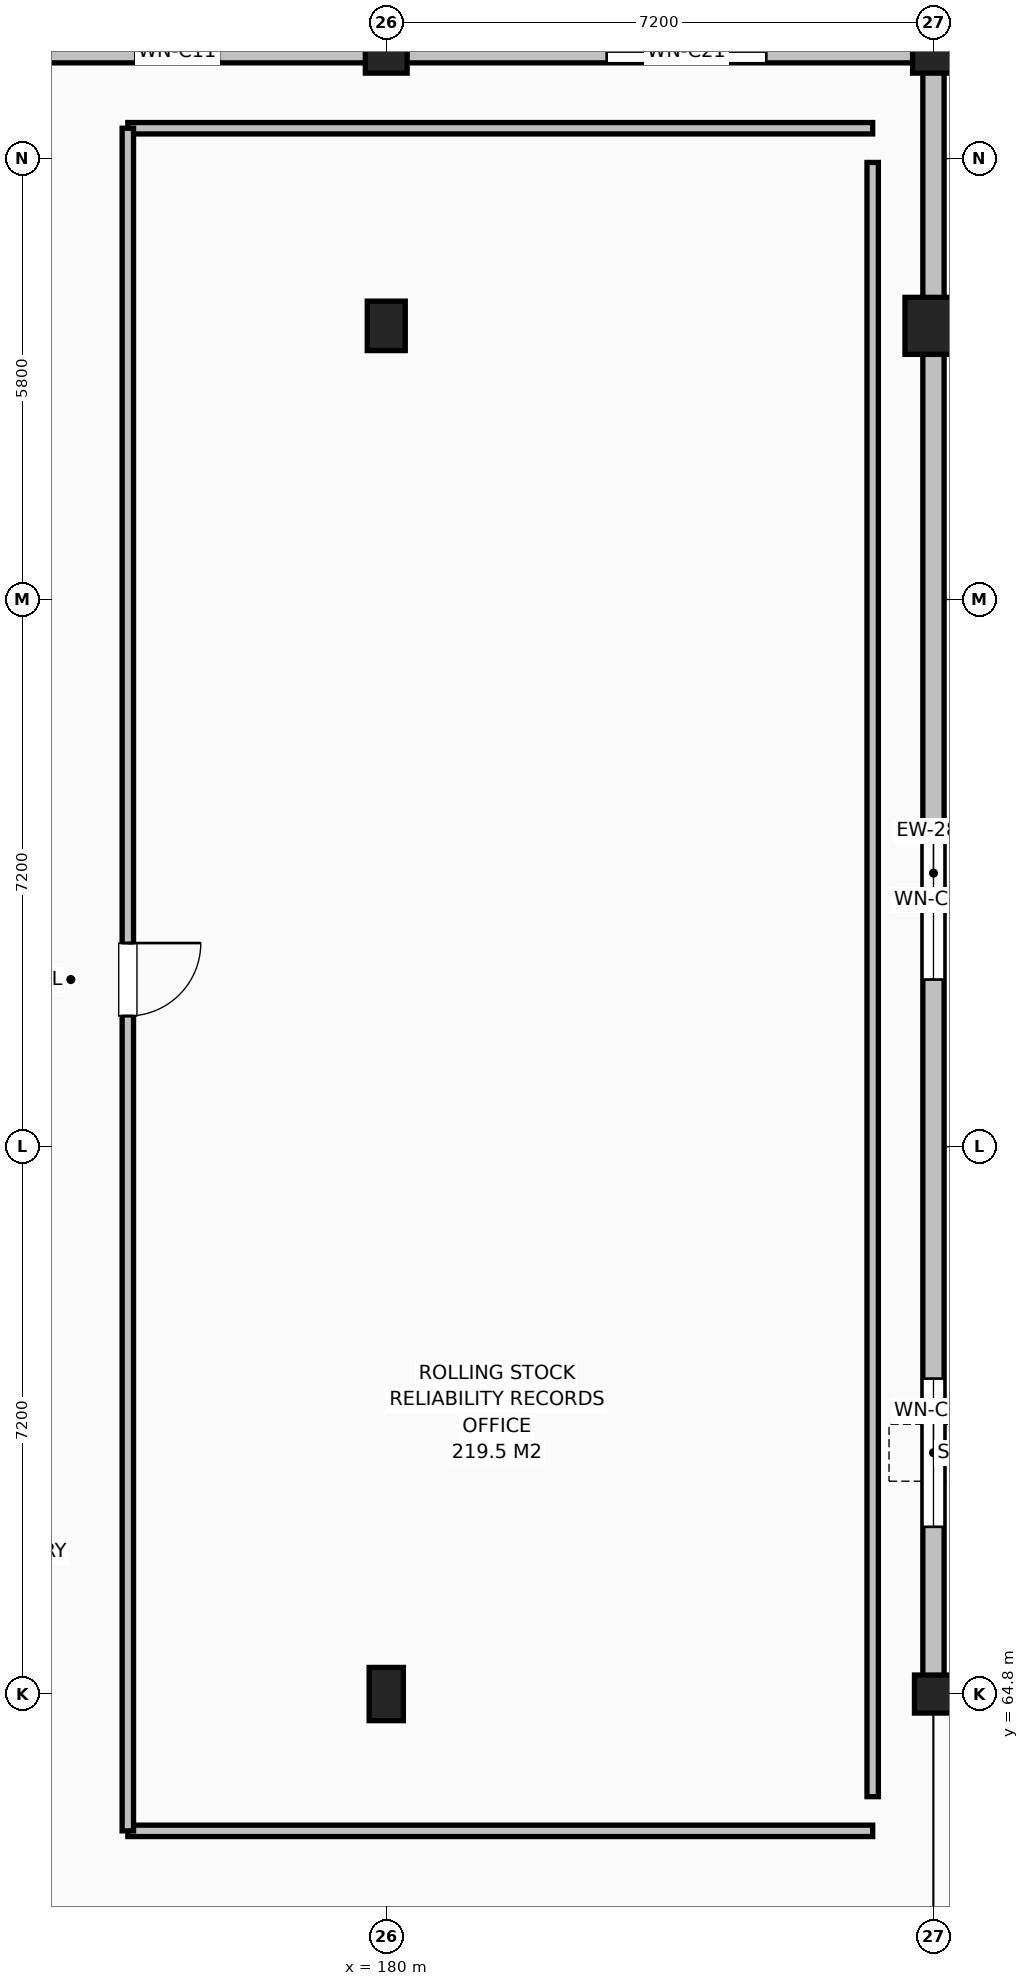
"""IFC4 building model, lengths in metres.
Left out: names, types, materials, properties, quantities, classifications, styles, units other than length and angle.
Written with IfcOpenShell. Run it as: python <this file> out.ifc"""

import sys

from ifc_helpers import new_model, si_unit, direction, frame, frame_2d, origin, origin_2d, place, context, subcontext, project, spatial, rectangle, circle, extrude, element, fill, save


model = new_model("IFC4")
c1 = context("Model", 3, precision=1e-05, world=origin(), true_north=direction((0.0, 1.0)))
c2 = subcontext(c1, "Body", "Model", "MODEL_VIEW")
j1 = project(units=[si_unit("LENGTHUNIT", "METRE"), si_unit("PLANEANGLEUNIT", "RADIAN")], contexts=[c1])
p1 = place(None, origin())
s1 = spatial("IfcSite", under=j1, at=p1, CompositionType="ELEMENT")
p2 = place(p1, origin())
s2 = spatial("IfcBuilding", under=s1, at=p2, CompositionType="ELEMENT")
p3 = place(p2, frame((0.0, 0.0, 4.8)))
s3 = spatial("IfcBuildingStorey", under=s2, at=p3, CompositionType="ELEMENT", Elevation=4.8)
p4 = place(p3, frame((180.0, 64.8, 0.0), z_axis=(0.0, 0.0, 1.0), x_axis=(1.0, 0.0, 0.0)))
e1 = element("IfcColumn", 1, at=p4, inside=s3, PredefinedType="COLUMN", context=c2, shape_type="SweptSolid", body=[
    extrude(rectangle(XDim=0.45, YDim=0.7, at=origin_2d()), origin(), (0.0, 0.0, 1.0), 4.2),
])
p5 = place(p3, frame((180.0, 82.8, 0.0), z_axis=(0.0, 0.0, 1.0), x_axis=(1.0, 0.0, 0.0)))
e2 = element("IfcColumn", 2, at=p5, inside=s3, PredefinedType="COLUMN", context=c2, shape_type="SweptSolid", body=[
    extrude(rectangle(XDim=0.5, YDim=0.65, at=origin_2d()), origin(), (0.0, 0.0, 1.0), 4.2),
])
p6 = place(p3, frame((180.0, 86.4, 0.0), z_axis=(0.0, 0.0, 1.0), x_axis=(1.0, 0.0, 0.0)))
e3 = element("IfcColumn", 3, at=p6, inside=s3, PredefinedType="COLUMN", context=c2, shape_type="SweptSolid", body=[
    extrude(rectangle(XDim=0.55, YDim=0.55, at=origin_2d()), origin(), (0.0, 0.0, 1.0), 4.2),
])
p7 = place(p3, frame((187.2, 64.8, 0.0), z_axis=(0.0, 0.0, 1.0), x_axis=(1.0, 0.0, 0.0)))
e4 = element("IfcColumn", 4, at=p7, inside=s3, PredefinedType="COLUMN", context=c2, shape_type="SweptSolid", body=[
    extrude(circle(Radius=0.25, at=origin_2d()), origin(), (0.0, 0.0, 1.0), 4.2),
])
p8 = place(p3, frame((187.2, 82.8, 0.0), z_axis=(0.0, 0.0, 1.0), x_axis=(1.0, 0.0, 0.0)))
e5 = element("IfcColumn", 5, at=p8, inside=s3, PredefinedType="COLUMN", context=c2, shape_type="SweptSolid", body=[
    extrude(circle(Radius=0.375, at=origin_2d()), origin(), (0.0, 0.0, 1.0), 4.2),
])
p9 = place(p3, frame((187.2, 86.4, 0.0), z_axis=(0.0, 0.0, 1.0), x_axis=(1.0, 0.0, 0.0)))
e6 = element("IfcColumn", 6, at=p9, inside=s3, PredefinedType="COLUMN", context=c2, shape_type="SweptSolid", body=[
    extrude(rectangle(XDim=0.55, YDim=0.55, at=origin_2d()), origin(), (0.0, 0.0, 1.0), 4.2),
])
p10 = place(p3, frame((187.2, 64.8, 0.0), z_axis=(0.0, 0.0, 1.0), x_axis=(0.0, 1.0, 0.0)))
e7 = element("IfcWall", 7, at=p10, inside=s3, PredefinedType="SOLIDWALL", context=c2, shape_type="SweptSolid", body=[
    extrude(rectangle(XDim=21.6, YDim=0.28, at=frame_2d((10.8, 0.0))), origin(), (0.0, 0.0, 1.0), 3.5),
])
p11 = place(p10, frame((2.2, 0.0, 0.78)))
e8 = element("IfcOpeningElement", 8, at=p11, cuts=e7, PredefinedType="OPENING", context=c2, shape_type="SweptSolid", body=[
    extrude(rectangle(XDim=1.95, YDim=1.8, at=frame_2d((0.975, 0.9))), frame((0.0, 0.15, 0.0), z_axis=(0.0, -1.0, 0.0), x_axis=(1.0, 0.0, 0.0)), (0.0, 0.0, 1.0), 0.3),
])
p12 = place(p10, frame((9.4, 0.0, 0.78)))
e9 = element("IfcOpeningElement", 9, at=p12, cuts=e7, PredefinedType="OPENING", context=c2, shape_type="SweptSolid", body=[
    extrude(rectangle(XDim=2.1, YDim=1.8, at=frame_2d((1.05, 0.9))), frame((0.0, 0.15, 0.0), z_axis=(0.0, -1.0, 0.0), x_axis=(1.0, 0.0, 0.0)), (0.0, 0.0, 1.0), 0.3),
])
p13 = place(p3, frame((187.2, 86.4, 0.0), z_axis=(0.0, 0.0, 1.0), x_axis=(-1.0, 0.0, 0.0)))
e10 = element("IfcWall", 10, at=p13, inside=s3, PredefinedType="SOLIDWALL", context=c2, shape_type="SweptSolid", body=[
    extrude(rectangle(XDim=21.6, YDim=0.28, at=frame_2d((10.8, 0.0))), origin(), (0.0, 0.0, 1.0), 3.5),
])
p14 = place(p13, frame((2.2, 0.0, 0.78)))
e11 = element("IfcOpeningElement", 11, at=p14, cuts=e10, PredefinedType="OPENING", context=c2, shape_type="SweptSolid", body=[
    extrude(rectangle(XDim=2.1, YDim=1.8, at=frame_2d((1.05, 0.9))), frame((0.0, 0.15, 0.0), z_axis=(0.0, -1.0, 0.0), x_axis=(1.0, 0.0, 0.0)), (0.0, 0.0, 1.0), 0.3),
])
p15 = place(p13, frame((9.4, 0.0, 0.78)))
e12 = element("IfcOpeningElement", 12, at=p15, cuts=e10, PredefinedType="OPENING", context=c2, shape_type="SweptSolid", body=[
    extrude(rectangle(XDim=1.1, YDim=1.65, at=frame_2d((0.55, 0.825))), frame((0.0, 0.15, 0.0), z_axis=(0.0, -1.0, 0.0), x_axis=(1.0, 0.0, 0.0)), (0.0, 0.0, 1.0), 0.3),
])
p16 = place(p3, frame((216.0, 64.8, 0.0), z_axis=(0.0, 0.0, 1.0), x_axis=(-1.0, 0.0, 0.0)))
e13 = element("IfcWall", 13, at=p16, inside=s3, PredefinedType="SOLIDWALL", context=c2, shape_type="SweptSolid", body=[
    extrude(rectangle(XDim=28.8, YDim=0.28, at=frame_2d((14.4, 0.0))), origin(), (0.0, 0.0, 1.0), 3.235),
])
p17 = place(p16, frame((2.2, 0.0, 0.72)))
e14 = element("IfcOpeningElement", 14, at=p17, cuts=e13, PredefinedType="OPENING", context=c2, shape_type="SweptSolid", body=[
    extrude(rectangle(XDim=1.8, YDim=2.15, at=frame_2d((0.9, 1.075))), frame((0.0, 0.15, 0.0), z_axis=(0.0, -1.0, 0.0), x_axis=(1.0, 0.0, 0.0)), (0.0, 0.0, 1.0), 0.3),
])
p18 = place(p16, frame((9.4, 0.0, 0.72)))
e15 = element("IfcOpeningElement", 15, at=p18, cuts=e13, PredefinedType="OPENING", context=c2, shape_type="SweptSolid", body=[
    extrude(rectangle(XDim=1.2, YDim=2.0, at=frame_2d((0.6, 1.0))), frame((0.0, 0.15, 0.0), z_axis=(0.0, -1.0, 0.0), x_axis=(1.0, 0.0, 0.0)), (0.0, 0.0, 1.0), 0.3),
])
p19 = place(p16, frame((16.6, 0.0, 0.72)))
e16 = element("IfcOpeningElement", 16, at=p19, cuts=e13, PredefinedType="OPENING", context=c2, shape_type="SweptSolid", body=[
    extrude(rectangle(XDim=1.35, YDim=2.05, at=frame_2d((0.675, 1.025))), frame((0.0, 0.15, 0.0), z_axis=(0.0, -1.0, 0.0), x_axis=(1.0, 0.0, 0.0)), (0.0, 0.0, 1.0), 0.3),
])
p20 = place(p3, frame((176.6, 85.4, 0.0), z_axis=(0.0, 0.0, 1.0), x_axis=(1.0, 0.0, 0.0)))
e17 = element("IfcWall", 17, at=p20, inside=s3, PredefinedType="PARTITIONING", context=c2, shape_type="SweptSolid", body=[
    extrude(rectangle(XDim=9.8, YDim=0.15, at=frame_2d((4.9, 0.0))), origin(), (0.0, 0.0, 1.0), 3.007),
])
p21 = place(p3, frame((186.4, 63.0, 0.0), z_axis=(0.0, 0.0, 1.0), x_axis=(-1.0, 0.0, 0.0)))
e18 = element("IfcWall", 18, at=p21, inside=s3, PredefinedType="PARTITIONING", context=c2, shape_type="SweptSolid", body=[
    extrude(rectangle(XDim=9.8, YDim=0.15, at=frame_2d((4.9, 0.0))), origin(), (0.0, 0.0, 1.0), 3.057),
])
p22 = place(p3, frame((186.4, 63.45, 0.0), z_axis=(0.0, 0.0, 1.0), x_axis=(0.0, 1.0, 0.0)))
e19 = element("IfcWall", 19, at=p22, inside=s3, PredefinedType="PARTITIONING", context=c2, shape_type="SweptSolid", body=[
    extrude(rectangle(XDim=21.5, YDim=0.15, at=frame_2d((10.75, 0.0))), origin(), (0.0, 0.0, 1.0), 3.407),
])
p23 = place(p3, frame((176.6, 85.4, 0.0), z_axis=(0.0, 0.0, 1.0), x_axis=(0.0, -1.0, 0.0)))
e20 = element("IfcWall", 20, at=p23, inside=s3, PredefinedType="PARTITIONING", context=c2, shape_type="SweptSolid", body=[
    extrude(rectangle(XDim=22.4, YDim=0.15, at=frame_2d((11.2, 0.0))), origin(), (0.0, 0.0, 1.0), 2.907),
])
p24 = place(p23, frame((10.72, 0.0, 0.0)))
e21 = element("IfcOpeningElement", 21, at=p24, cuts=e20, PredefinedType="OPENING", context=c2, shape_type="SweptSolid", body=[
    extrude(rectangle(XDim=0.96, YDim=2.15, at=frame_2d((0.48, 1.075))), frame((0.0, 0.085, 0.0), z_axis=(0.0, -1.0, 0.0), x_axis=(1.0, 0.0, 0.0)), (0.0, 0.0, 1.0), 0.17),
])
p25 = place(p11, origin())
e22 = element("IfcWindow", 22, at=p25, inside=s3, PartitioningType="SINGLE_PANEL", PredefinedType="WINDOW", context=c2, shape_type="SweptSolid", body=[
    extrude(rectangle(XDim=1.95, YDim=1.8, at=frame_2d((0.975, 0.9))), frame((0.0, 0.03, 0.0), z_axis=(0.0, -1.0, 0.0), x_axis=(1.0, 0.0, 0.0)), (0.0, 0.0, 1.0), 0.06),
])
fill(e8, e22)
p26 = place(p12, origin())
e23 = element("IfcWindow", 23, at=p26, inside=s3, PartitioningType="SINGLE_PANEL", PredefinedType="WINDOW", context=c2, shape_type="SweptSolid", body=[
    extrude(rectangle(XDim=2.1, YDim=1.8, at=frame_2d((1.05, 0.9))), frame((0.0, 0.03, 0.0), z_axis=(0.0, -1.0, 0.0), x_axis=(1.0, 0.0, 0.0)), (0.0, 0.0, 1.0), 0.06),
])
fill(e9, e23)
p27 = place(p14, origin())
e24 = element("IfcWindow", 24, at=p27, inside=s3, PartitioningType="SINGLE_PANEL", PredefinedType="WINDOW", context=c2, shape_type="SweptSolid", body=[
    extrude(rectangle(XDim=2.1, YDim=1.8, at=frame_2d((1.05, 0.9))), frame((0.0, 0.03, 0.0), z_axis=(0.0, -1.0, 0.0), x_axis=(1.0, 0.0, 0.0)), (0.0, 0.0, 1.0), 0.06),
])
fill(e11, e24)
p28 = place(p15, origin())
e25 = element("IfcWindow", 25, at=p28, inside=s3, PartitioningType="SINGLE_PANEL", PredefinedType="WINDOW", context=c2, shape_type="SweptSolid", body=[
    extrude(rectangle(XDim=1.1, YDim=1.65, at=frame_2d((0.55, 0.825))), frame((0.0, 0.03, 0.0), z_axis=(0.0, -1.0, 0.0), x_axis=(1.0, 0.0, 0.0)), (0.0, 0.0, 1.0), 0.06),
])
fill(e12, e25)
p29 = place(p24, origin())
e26 = element("IfcDoor", 26, at=p29, inside=s3, OperationType="SINGLE_SWING_LEFT", PredefinedType="DOOR", context=c2, shape_type="SweptSolid", body=[
    extrude(rectangle(XDim=0.96, YDim=2.15, at=frame_2d((0.48, 1.075))), frame((0.0, 0.025, 0.0), z_axis=(0.0, -1.0, 0.0), x_axis=(1.0, 0.0, 0.0)), (0.0, 0.0, 1.0), 0.05),
])
fill(e21, e26)
save(model, sys.argv[1])
